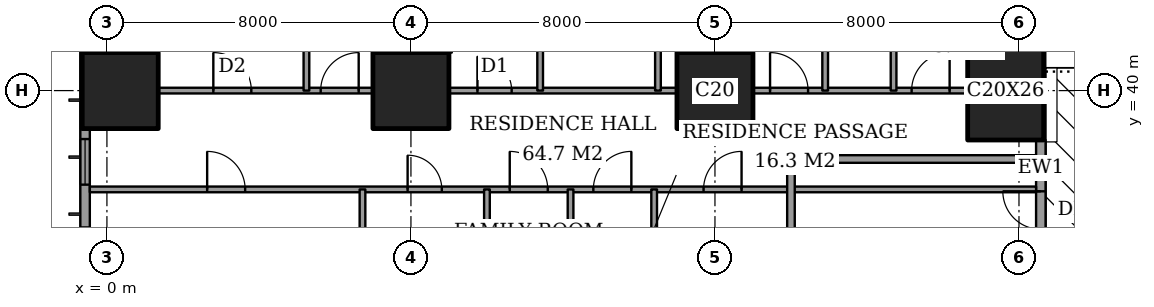
"""IFC4 building model, lengths in metres.
Left out: names, types, materials, properties, quantities, classifications, styles, units other than length and angle.
Written with IfcOpenShell. Run it as: python <this file> out.ifc"""

import sys

from ifc_helpers import new_model, si_unit, direction, frame, frame_2d, origin, origin_2d, place, context, subcontext, project, spatial, rectangle, extrude, element, fill, save


model = new_model("IFC4")
c1 = context("Model", 3, precision=1e-05, world=origin(), true_north=direction((0.0, 1.0)))
c2 = subcontext(c1, "Body", "Model", "MODEL_VIEW")
j1 = project(units=[si_unit("LENGTHUNIT", "METRE"), si_unit("PLANEANGLEUNIT", "RADIAN")], contexts=[c1])
p1 = place(None, origin())
s1 = spatial("IfcSite", under=j1, at=p1, CompositionType="ELEMENT")
p2 = place(p1, origin())
s2 = spatial("IfcBuilding", under=s1, at=p2, CompositionType="ELEMENT")
p3 = place(p2, frame((0.0, 0.0, 96.2)))
s3 = spatial("IfcBuildingStorey", under=s2, at=p3, CompositionType="ELEMENT", Elevation=96.2)
for number, where, z_axis, x_axis in (
    (1, (0.35, 40.0, 0.0), (0.0, 0.0, 1.0), (1.0, 0.0, 0.0)),
    (2, (8.0, 40.0, 0.0), (0.0, 0.0, 1.0), (1.0, 0.0, 0.0)),
    (3, (16.0, 40.0, 0.0), (0.0, 0.0, 1.0), (1.0, 0.0, 0.0)),
):
    element("IfcColumn", number, at=place(p3, frame(where, z_axis=z_axis, x_axis=x_axis)), inside=s3, PredefinedType="COLUMN", context=c2, shape_type="SweptSolid", body=[
        extrude(rectangle(XDim=2.0, YDim=2.0, at=origin_2d()), origin(), (0.0, 0.0, 1.0), 3.6),
    ])
p4 = place(p3, frame((23.65, 40.0, 0.0), z_axis=(0.0, 0.0, 1.0), x_axis=(1.0, 0.0, 0.0)))
e4 = element("IfcColumn", 4, at=p4, inside=s3, PredefinedType="COLUMN", context=c2, shape_type="SweptSolid", body=[
    extrude(rectangle(XDim=2.0, YDim=2.6, at=origin_2d()), origin(), (0.0, 0.0, 1.0), 3.6),
])
p5 = place(p3, frame((24.575, 35.0, 0.0), z_axis=(0.0, 0.0, 1.0), x_axis=(0.0, 1.0, 0.0)))
e5 = element("IfcWall", 5, at=p5, inside=s3, PredefinedType="SOLIDWALL", context=c2, shape_type="SweptSolid", body=[
    extrude(rectangle(XDim=3.7, YDim=0.25, at=frame_2d((1.85, 0.0))), origin(), (0.0, 0.0, 1.0), 3.6),
])
p6 = place(p5, frame((1.35, 0.0, 0.0)))
e6 = element("IfcOpeningElement", 6, at=p6, cuts=e5, PredefinedType="OPENING", context=c2, shape_type="SweptSolid", body=[
    extrude(rectangle(XDim=1.0, YDim=2.1, at=frame_2d((0.5, 1.05))), frame((0.0, 0.135, 0.0), z_axis=(0.0, -1.0, 0.0), x_axis=(1.0, 0.0, 0.0)), (0.0, 0.0, 1.0), 0.27),
])
p7 = place(p3, frame((-0.575, 44.825, 0.0), z_axis=(0.0, 0.0, 1.0), x_axis=(0.0, -1.0, 0.0)))
e7 = element("IfcWall", 7, at=p7, inside=s3, PredefinedType="SOLIDWALL", context=c2, shape_type="SweptSolid", body=[
    extrude(rectangle(XDim=41.65, YDim=0.25, at=frame_2d((20.825, 0.0))), origin(), (0.0, 0.0, 1.0), 3.6),
])
p8 = place(p7, frame((0.775, 0.0, 0.4)))
e8 = element("IfcOpeningElement", 8, at=p8, cuts=e7, PredefinedType="OPENING", context=c2, shape_type="SweptSolid", body=[
    extrude(rectangle(XDim=2.4, YDim=2.2, at=frame_2d((1.2, 1.1))), frame((0.0, 0.135, 0.0), z_axis=(0.0, -1.0, 0.0), x_axis=(1.0, 0.0, 0.0)), (0.0, 0.0, 1.0), 0.27),
])
p9 = place(p7, frame((6.1, 0.0, 0.4)))
e9 = element("IfcOpeningElement", 9, at=p9, cuts=e7, PredefinedType="OPENING", context=c2, shape_type="SweptSolid", body=[
    extrude(rectangle(XDim=1.2, YDim=2.2, at=frame_2d((0.6, 1.1))), frame((0.0, 0.135, 0.0), z_axis=(0.0, -1.0, 0.0), x_axis=(1.0, 0.0, 0.0)), (0.0, 0.0, 1.0), 0.27),
])
p10 = place(p7, frame((8.425, 0.0, 0.4)))
e10 = element("IfcOpeningElement", 10, at=p10, cuts=e7, PredefinedType="OPENING", context=c2, shape_type="SweptSolid", body=[
    extrude(rectangle(XDim=2.4, YDim=2.2, at=frame_2d((1.2, 1.1))), frame((0.0, 0.135, 0.0), z_axis=(0.0, -1.0, 0.0), x_axis=(1.0, 0.0, 0.0)), (0.0, 0.0, 1.0), 0.27),
])
p11 = place(p7, frame((15.625, 0.0, 0.4)))
e11 = element("IfcOpeningElement", 11, at=p11, cuts=e7, PredefinedType="OPENING", context=c2, shape_type="SweptSolid", body=[
    extrude(rectangle(XDim=2.4, YDim=2.2, at=frame_2d((1.2, 1.1))), frame((0.0, 0.135, 0.0), z_axis=(0.0, -1.0, 0.0), x_axis=(1.0, 0.0, 0.0)), (0.0, 0.0, 1.0), 0.27),
])
p12 = place(p7, frame((23.625, 0.0, 0.4)))
e12 = element("IfcOpeningElement", 12, at=p12, cuts=e7, PredefinedType="OPENING", context=c2, shape_type="SweptSolid", body=[
    extrude(rectangle(XDim=2.4, YDim=2.2, at=frame_2d((1.2, 1.1))), frame((0.0, 0.135, 0.0), z_axis=(0.0, -1.0, 0.0), x_axis=(1.0, 0.0, 0.0)), (0.0, 0.0, 1.0), 0.27),
])
p13 = place(p7, frame((30.725, 0.0, 0.4)))
e13 = element("IfcOpeningElement", 13, at=p13, cuts=e7, PredefinedType="OPENING", context=c2, shape_type="SweptSolid", body=[
    extrude(rectangle(XDim=2.4, YDim=2.2, at=frame_2d((1.2, 1.1))), frame((0.0, 0.135, 0.0), z_axis=(0.0, -1.0, 0.0), x_axis=(1.0, 0.0, 0.0)), (0.0, 0.0, 1.0), 0.27),
])
p14 = place(p7, frame((34.325, 0.0, 0.4)))
e14 = element("IfcOpeningElement", 14, at=p14, cuts=e7, PredefinedType="OPENING", context=c2, shape_type="SweptSolid", body=[
    extrude(rectangle(XDim=1.2, YDim=2.2, at=frame_2d((0.6, 1.1))), frame((0.0, 0.135, 0.0), z_axis=(0.0, -1.0, 0.0), x_axis=(1.0, 0.0, 0.0)), (0.0, 0.0, 1.0), 0.27),
])
p15 = place(p7, frame((38.475, 0.0, 0.4)))
e15 = element("IfcOpeningElement", 15, at=p15, cuts=e7, PredefinedType="OPENING", context=c2, shape_type="SweptSolid", body=[
    extrude(rectangle(XDim=2.4, YDim=2.2, at=frame_2d((1.2, 1.1))), frame((0.0, 0.135, 0.0), z_axis=(0.0, -1.0, 0.0), x_axis=(1.0, 0.0, 0.0)), (0.0, 0.0, 1.0), 0.27),
])
p16 = place(p3, frame((-0.45, 37.4, 0.0), z_axis=(0.0, 0.0, 1.0), x_axis=(1.0, 0.0, 0.0)))
e16 = element("IfcWall", 16, at=p16, inside=s3, PredefinedType="PARTITIONING", context=c2, shape_type="SweptSolid", body=[
    extrude(rectangle(XDim=24.9, YDim=0.15, at=frame_2d((12.45, 0.0))), origin(), (0.0, 0.0, 1.0), 3.35),
])
p17 = place(p16, frame((13.25, 0.0, 0.0)))
e17 = element("IfcOpeningElement", 17, at=p17, cuts=e16, PredefinedType="OPENING", context=c2, shape_type="SweptSolid", body=[
    extrude(rectangle(XDim=1.0, YDim=2.1, at=frame_2d((0.5, 1.05))), frame((0.0, 0.085, 0.0), z_axis=(0.0, -1.0, 0.0), x_axis=(1.0, 0.0, 0.0)), (0.0, 0.0, 1.0), 0.17),
])
p18 = place(p16, frame((3.087, 0.0, 0.0)))
e18 = element("IfcOpeningElement", 18, at=p18, cuts=e16, PredefinedType="OPENING", context=c2, shape_type="SweptSolid", body=[
    extrude(rectangle(XDim=1.0, YDim=2.1, at=frame_2d((0.5, 1.05))), frame((0.0, 0.085, 0.0), z_axis=(0.0, -1.0, 0.0), x_axis=(1.0, 0.0, 0.0)), (0.0, 0.0, 1.0), 0.17),
])
p19 = place(p16, frame((8.363, 0.0, 0.0)))
e19 = element("IfcOpeningElement", 19, at=p19, cuts=e16, PredefinedType="OPENING", context=c2, shape_type="SweptSolid", body=[
    extrude(rectangle(XDim=0.9, YDim=2.1, at=frame_2d((0.45, 1.05))), frame((0.0, 0.085, 0.0), z_axis=(0.0, -1.0, 0.0), x_axis=(1.0, 0.0, 0.0)), (0.0, 0.0, 1.0), 0.17),
])
p20 = place(p16, frame((11.05, 0.0, 0.0)))
e20 = element("IfcOpeningElement", 20, at=p20, cuts=e16, PredefinedType="OPENING", context=c2, shape_type="SweptSolid", body=[
    extrude(rectangle(XDim=1.0, YDim=2.1, at=frame_2d((0.5, 1.05))), frame((0.0, 0.085, 0.0), z_axis=(0.0, -1.0, 0.0), x_axis=(1.0, 0.0, 0.0)), (0.0, 0.0, 1.0), 0.17),
])
p21 = place(p16, frame((16.15, 0.0, 0.0)))
e21 = element("IfcOpeningElement", 21, at=p21, cuts=e16, PredefinedType="OPENING", context=c2, shape_type="SweptSolid", body=[
    extrude(rectangle(XDim=1.0, YDim=2.1, at=frame_2d((0.5, 1.05))), frame((0.0, 0.085, 0.0), z_axis=(0.0, -1.0, 0.0), x_axis=(1.0, 0.0, 0.0)), (0.0, 0.0, 1.0), 0.17),
])
p22 = place(p3, frame((18.0, 38.2, 0.0), z_axis=(0.0, 0.0, 1.0), x_axis=(1.0, 0.0, 0.0)))
e22 = element("IfcWall", 22, at=p22, inside=s3, PredefinedType="PARTITIONING", context=c2, shape_type="SweptSolid", body=[
    extrude(rectangle(XDim=6.45, YDim=0.2, at=frame_2d((3.225, 0.0))), origin(), (0.0, 0.0, 1.0), 3.35),
])
p23 = place(p3, frame((1.35, 40.0, 0.0), z_axis=(0.0, 0.0, 1.0), x_axis=(1.0, 0.0, 0.0)))
e23 = element("IfcWall", 23, at=p23, inside=s3, PredefinedType="PARTITIONING", context=c2, shape_type="SweptSolid", body=[
    extrude(rectangle(XDim=5.65, YDim=0.15, at=frame_2d((2.825, 0.0))), origin(), (0.0, 0.0, 1.0), 3.35),
])
p24 = place(p23, frame((1.45, 0.0, 0.0)))
e24 = element("IfcOpeningElement", 24, at=p24, cuts=e23, PredefinedType="OPENING", context=c2, shape_type="SweptSolid", body=[
    extrude(rectangle(XDim=1.0, YDim=2.1, at=frame_2d((0.5, 1.05))), frame((0.0, 0.085, 0.0), z_axis=(0.0, -1.0, 0.0), x_axis=(1.0, 0.0, 0.0)), (0.0, 0.0, 1.0), 0.17),
])
p25 = place(p23, frame((4.275, 0.0, 0.0)))
e25 = element("IfcOpeningElement", 25, at=p25, cuts=e23, PredefinedType="OPENING", context=c2, shape_type="SweptSolid", body=[
    extrude(rectangle(XDim=1.0, YDim=2.1, at=frame_2d((0.5, 1.05))), frame((0.0, 0.085, 0.0), z_axis=(0.0, -1.0, 0.0), x_axis=(1.0, 0.0, 0.0)), (0.0, 0.0, 1.0), 0.17),
])
p26 = place(p3, frame((9.0, 40.0, 0.0), z_axis=(0.0, 0.0, 1.0), x_axis=(1.0, 0.0, 0.0)))
e26 = element("IfcWall", 26, at=p26, inside=s3, PredefinedType="PARTITIONING", context=c2, shape_type="SweptSolid", body=[
    extrude(rectangle(XDim=6.0, YDim=0.15, at=frame_2d((3.0, 0.0))), origin(), (0.0, 0.0, 1.0), 3.35),
])
p27 = place(p26, frame((0.75, 0.0, 0.0)))
e27 = element("IfcOpeningElement", 27, at=p27, cuts=e26, PredefinedType="OPENING", context=c2, shape_type="SweptSolid", body=[
    extrude(rectangle(XDim=0.9, YDim=2.1, at=frame_2d((0.45, 1.05))), frame((0.0, 0.085, 0.0), z_axis=(0.0, -1.0, 0.0), x_axis=(1.0, 0.0, 0.0)), (0.0, 0.0, 1.0), 0.17),
])
p28 = place(p3, frame((17.0, 40.0, 0.0), z_axis=(0.0, 0.0, 1.0), x_axis=(1.0, 0.0, 0.0)))
e28 = element("IfcWall", 28, at=p28, inside=s3, PredefinedType="PARTITIONING", context=c2, shape_type="SweptSolid", body=[
    extrude(rectangle(XDim=5.65, YDim=0.15, at=frame_2d((2.825, 0.0))), origin(), (0.0, 0.0, 1.0), 3.35),
])
p29 = place(p28, frame((0.45, 0.0, 0.0)))
e29 = element("IfcOpeningElement", 29, at=p29, cuts=e28, PredefinedType="OPENING", context=c2, shape_type="SweptSolid", body=[
    extrude(rectangle(XDim=1.0, YDim=2.1, at=frame_2d((0.5, 1.05))), frame((0.0, 0.085, 0.0), z_axis=(0.0, -1.0, 0.0), x_axis=(1.0, 0.0, 0.0)), (0.0, 0.0, 1.0), 0.17),
])
p30 = place(p28, frame((4.175, 0.0, 0.0)))
e30 = element("IfcOpeningElement", 30, at=p30, cuts=e28, PredefinedType="OPENING", context=c2, shape_type="SweptSolid", body=[
    extrude(rectangle(XDim=1.0, YDim=2.1, at=frame_2d((0.5, 1.05))), frame((0.0, 0.085, 0.0), z_axis=(0.0, -1.0, 0.0), x_axis=(1.0, 0.0, 0.0)), (0.0, 0.0, 1.0), 0.17),
])
p31 = place(p3, frame((5.25, 40.0, 0.0), z_axis=(0.0, 0.0, 1.0), x_axis=(0.0, 1.0, 0.0)))
e31 = element("IfcWall", 31, at=p31, inside=s3, PredefinedType="PARTITIONING", context=c2, shape_type="SweptSolid", body=[
    extrude(rectangle(XDim=8.45, YDim=0.15, at=frame_2d((4.225, 0.0))), origin(), (0.0, 0.0, 1.0), 3.35),
])
p32 = place(p3, frame((6.725, 33.2, 0.0), z_axis=(0.0, 0.0, 1.0), x_axis=(0.0, 1.0, 0.0)))
e32 = element("IfcWall", 32, at=p32, inside=s3, PredefinedType="PARTITIONING", context=c2, shape_type="SweptSolid", body=[
    extrude(rectangle(XDim=4.2, YDim=0.15, at=frame_2d((2.1, 0.0))), origin(), (0.0, 0.0, 1.0), 3.35),
])
p33 = place(p3, frame((10.0, 28.0, 0.0), z_axis=(0.0, 0.0, 1.0), x_axis=(0.0, 1.0, 0.0)))
e33 = element("IfcWall", 33, at=p33, inside=s3, PredefinedType="PARTITIONING", context=c2, shape_type="SweptSolid", body=[
    extrude(rectangle(XDim=9.4, YDim=0.15, at=frame_2d((4.7, 0.0))), origin(), (0.0, 0.0, 1.0), 3.35),
])
p34 = place(p33, frame((0.5, 0.0, 0.0)))
e34 = element("IfcOpeningElement", 34, at=p34, cuts=e33, PredefinedType="OPENING", context=c2, shape_type="SweptSolid", body=[
    extrude(rectangle(XDim=1.0, YDim=2.1, at=frame_2d((0.5, 1.05))), frame((0.0, 0.085, 0.0), z_axis=(0.0, -1.0, 0.0), x_axis=(1.0, 0.0, 0.0)), (0.0, 0.0, 1.0), 0.17),
])
p35 = place(p3, frame((11.4, 40.0, 0.0), z_axis=(0.0, 0.0, 1.0), x_axis=(0.0, 1.0, 0.0)))
e35 = element("IfcWall", 35, at=p35, inside=s3, PredefinedType="PARTITIONING", context=c2, shape_type="SweptSolid", body=[
    extrude(rectangle(XDim=8.45, YDim=0.15, at=frame_2d((4.225, 0.0))), origin(), (0.0, 0.0, 1.0), 3.35),
])
for number, where, z_axis, x_axis in (
    (36, (12.2, 30.0, 0.0), (0.0, 0.0, 1.0), (0.0, 1.0, 0.0)),
    (37, (14.4, 30.0, 0.0), (0.0, 0.0, 1.0), (0.0, 1.0, 0.0)),
):
    element("IfcWall", number, at=place(p3, frame(where, z_axis=z_axis, x_axis=x_axis)), inside=s3, PredefinedType="PARTITIONING", context=c2, shape_type="SweptSolid", body=[
        extrude(rectangle(XDim=7.4, YDim=0.15, at=frame_2d((3.7, 0.0))), origin(), (0.0, 0.0, 1.0), 3.35),
    ])
p36 = place(p3, frame((14.5, 40.0, 0.0), z_axis=(0.0, 0.0, 1.0), x_axis=(0.0, 1.0, 0.0)))
e38 = element("IfcWall", 38, at=p36, inside=s3, PredefinedType="PARTITIONING", context=c2, shape_type="SweptSolid", body=[
    extrude(rectangle(XDim=8.45, YDim=0.15, at=frame_2d((4.225, 0.0))), origin(), (0.0, 0.0, 1.0), 3.35),
])
p37 = place(p36, frame((3.775, 0.0, 0.0)))
e39 = element("IfcOpeningElement", 39, at=p37, cuts=e38, PredefinedType="OPENING", context=c2, shape_type="SweptSolid", body=[
    extrude(rectangle(XDim=0.9, YDim=2.1, at=frame_2d((0.45, 1.05))), frame((0.0, 0.085, 0.0), z_axis=(0.0, -1.0, 0.0), x_axis=(1.0, 0.0, 0.0)), (0.0, 0.0, 1.0), 0.17),
])
p38 = place(p3, frame((18.0, 28.0, 0.0), z_axis=(0.0, 0.0, 1.0), x_axis=(0.0, 1.0, 0.0)))
e40 = element("IfcWall", 40, at=p38, inside=s3, PredefinedType="PARTITIONING", context=c2, shape_type="SweptSolid", body=[
    extrude(rectangle(XDim=10.2, YDim=0.2, at=frame_2d((5.1, 0.0))), origin(), (0.0, 0.0, 1.0), 3.35),
])
p39 = place(p3, frame((18.9, 40.0, 0.0), z_axis=(0.0, 0.0, 1.0), x_axis=(0.0, 1.0, 0.0)))
e41 = element("IfcWall", 41, at=p39, inside=s3, PredefinedType="PARTITIONING", context=c2, shape_type="SweptSolid", body=[
    extrude(rectangle(XDim=8.45, YDim=0.15, at=frame_2d((4.225, 0.0))), origin(), (0.0, 0.0, 1.0), 3.35),
])
p40 = place(p3, frame((20.7, 40.0, 0.0), z_axis=(0.0, 0.0, 1.0), x_axis=(0.0, 1.0, 0.0)))
e42 = element("IfcWall", 42, at=p40, inside=s3, PredefinedType="PARTITIONING", context=c2, shape_type="SweptSolid", body=[
    extrude(rectangle(XDim=8.45, YDim=0.15, at=frame_2d((4.225, 0.0))), origin(), (0.0, 0.0, 1.0), 3.35),
])
p41 = place(p40, frame((3.775, 0.0, 0.0)))
e43 = element("IfcOpeningElement", 43, at=p41, cuts=e42, PredefinedType="OPENING", context=c2, shape_type="SweptSolid", body=[
    extrude(rectangle(XDim=0.9, YDim=2.1, at=frame_2d((0.45, 1.05))), frame((0.0, 0.085, 0.0), z_axis=(0.0, -1.0, 0.0), x_axis=(1.0, 0.0, 0.0)), (0.0, 0.0, 1.0), 0.17),
])
p42 = place(p6, origin())
e44 = element("IfcDoor", 44, at=p42, inside=s3, OperationType="SINGLE_SWING_LEFT", PredefinedType="DOOR", context=c2, shape_type="SweptSolid", body=[
    extrude(rectangle(XDim=1.0, YDim=2.1, at=frame_2d((0.5, 1.05))), frame((0.0, 0.025, 0.0), z_axis=(0.0, -1.0, 0.0), x_axis=(1.0, 0.0, 0.0)), (0.0, 0.0, 1.0), 0.05),
])
fill(e6, e44)
p43 = place(p9, origin())
e45 = element("IfcWindow", 45, at=p43, inside=s3, PartitioningType="SINGLE_PANEL", PredefinedType="WINDOW", context=c2, shape_type="SweptSolid", body=[
    extrude(rectangle(XDim=1.2, YDim=2.2, at=frame_2d((0.6, 1.1))), frame((0.0, 0.03, 0.0), z_axis=(0.0, -1.0, 0.0), x_axis=(1.0, 0.0, 0.0)), (0.0, 0.0, 1.0), 0.06),
])
fill(e9, e45)
p44 = place(p24, origin())
e46 = element("IfcDoor", 46, at=p44, inside=s3, OperationType="SINGLE_SWING_RIGHT", PredefinedType="DOOR", context=c2, shape_type="SweptSolid", body=[
    extrude(rectangle(XDim=1.0, YDim=2.1, at=frame_2d((0.5, 1.05))), frame((0.0, 0.025, 0.0), z_axis=(0.0, -1.0, 0.0), x_axis=(1.0, 0.0, 0.0)), (0.0, 0.0, 1.0), 0.05),
])
fill(e24, e46)
p45 = place(p25, origin())
e47 = element("IfcDoor", 47, at=p45, inside=s3, OperationType="SINGLE_SWING_LEFT", PredefinedType="DOOR", context=c2, shape_type="SweptSolid", body=[
    extrude(rectangle(XDim=1.0, YDim=2.1, at=frame_2d((0.5, 1.05))), frame((0.0, 0.025, 0.0), z_axis=(0.0, -1.0, 0.0), x_axis=(1.0, 0.0, 0.0)), (0.0, 0.0, 1.0), 0.05),
])
fill(e25, e47)
p46 = place(p27, origin())
e48 = element("IfcDoor", 48, at=p46, inside=s3, OperationType="SINGLE_SWING_RIGHT", PredefinedType="DOOR", context=c2, shape_type="SweptSolid", body=[
    extrude(rectangle(XDim=0.9, YDim=2.1, at=frame_2d((0.45, 1.05))), frame((0.0, 0.025, 0.0), z_axis=(0.0, -1.0, 0.0), x_axis=(1.0, 0.0, 0.0)), (0.0, 0.0, 1.0), 0.05),
])
fill(e27, e48)
p47 = place(p29, origin())
e49 = element("IfcDoor", 49, at=p47, inside=s3, OperationType="SINGLE_SWING_RIGHT", PredefinedType="DOOR", context=c2, shape_type="SweptSolid", body=[
    extrude(rectangle(XDim=1.0, YDim=2.1, at=frame_2d((0.5, 1.05))), frame((0.0, 0.025, 0.0), z_axis=(0.0, -1.0, 0.0), x_axis=(1.0, 0.0, 0.0)), (0.0, 0.0, 1.0), 0.05),
])
fill(e29, e49)
p48 = place(p30, origin())
e50 = element("IfcDoor", 50, at=p48, inside=s3, OperationType="SINGLE_SWING_LEFT", PredefinedType="DOOR", context=c2, shape_type="SweptSolid", body=[
    extrude(rectangle(XDim=1.0, YDim=2.1, at=frame_2d((0.5, 1.05))), frame((0.0, 0.025, 0.0), z_axis=(0.0, -1.0, 0.0), x_axis=(1.0, 0.0, 0.0)), (0.0, 0.0, 1.0), 0.05),
])
fill(e30, e50)
p49 = place(p17, origin())
e51 = element("IfcDoor", 51, at=p49, inside=s3, OperationType="SINGLE_SWING_LEFT", PredefinedType="DOOR", context=c2, shape_type="SweptSolid", body=[
    extrude(rectangle(XDim=1.0, YDim=2.1, at=frame_2d((0.5, 1.05))), frame((0.0, 0.025, 0.0), z_axis=(0.0, -1.0, 0.0), x_axis=(1.0, 0.0, 0.0)), (0.0, 0.0, 1.0), 0.05),
])
fill(e17, e51)
p50 = place(p18, origin())
e52 = element("IfcDoor", 52, at=p50, inside=s3, OperationType="SINGLE_SWING_RIGHT", PredefinedType="DOOR", context=c2, shape_type="SweptSolid", body=[
    extrude(rectangle(XDim=1.0, YDim=2.1, at=frame_2d((0.5, 1.05))), frame((0.0, 0.025, 0.0), z_axis=(0.0, -1.0, 0.0), x_axis=(1.0, 0.0, 0.0)), (0.0, 0.0, 1.0), 0.05),
])
fill(e18, e52)
p51 = place(p19, origin())
e53 = element("IfcDoor", 53, at=p51, inside=s3, OperationType="SINGLE_SWING_RIGHT", PredefinedType="DOOR", context=c2, shape_type="SweptSolid", body=[
    extrude(rectangle(XDim=0.9, YDim=2.1, at=frame_2d((0.45, 1.05))), frame((0.0, 0.025, 0.0), z_axis=(0.0, -1.0, 0.0), x_axis=(1.0, 0.0, 0.0)), (0.0, 0.0, 1.0), 0.05),
])
fill(e19, e53)
p52 = place(p20, origin())
e54 = element("IfcDoor", 54, at=p52, inside=s3, OperationType="SINGLE_SWING_RIGHT", PredefinedType="DOOR", context=c2, shape_type="SweptSolid", body=[
    extrude(rectangle(XDim=1.0, YDim=2.1, at=frame_2d((0.5, 1.05))), frame((0.0, 0.025, 0.0), z_axis=(0.0, -1.0, 0.0), x_axis=(1.0, 0.0, 0.0)), (0.0, 0.0, 1.0), 0.05),
])
fill(e20, e54)
p53 = place(p21, origin())
e55 = element("IfcDoor", 55, at=p53, inside=s3, OperationType="SINGLE_SWING_LEFT", PredefinedType="DOOR", context=c2, shape_type="SweptSolid", body=[
    extrude(rectangle(XDim=1.0, YDim=2.1, at=frame_2d((0.5, 1.05))), frame((0.0, 0.025, 0.0), z_axis=(0.0, -1.0, 0.0), x_axis=(1.0, 0.0, 0.0)), (0.0, 0.0, 1.0), 0.05),
])
fill(e21, e55)
save(model, sys.argv[1])
